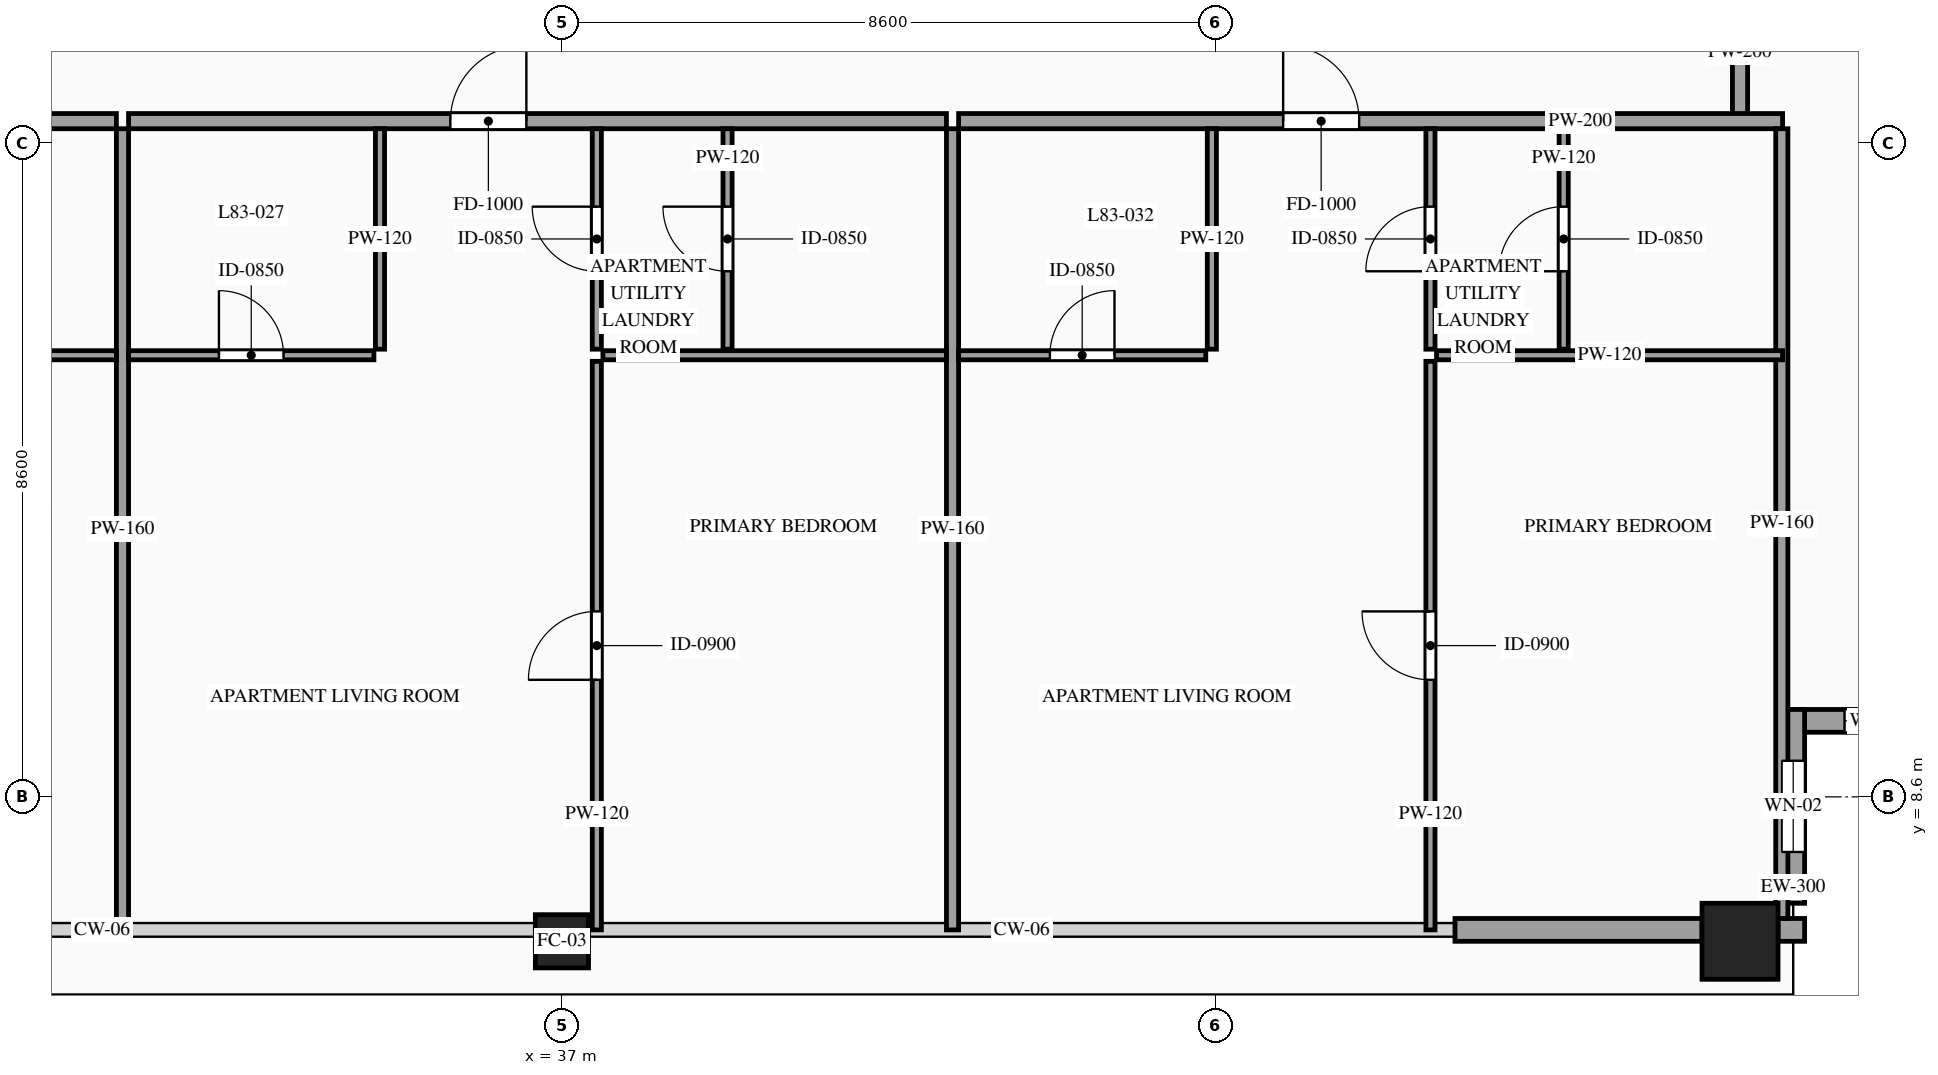
"""IFC4 building model, lengths in metres.
Left out: names, types, materials, properties, quantities, classifications, styles, units other than length and angle.
Written with IfcOpenShell. Run it as: python <this file> out.ifc"""

import sys

from ifc_helpers import new_model, si_unit, direction, frame, frame_2d, origin, origin_2d, place, context, subcontext, project, spatial, rectangle, hollow_rectangle, extrude, source, transform, mapped, element, fill, save


model = new_model("IFC4")
c1 = context("Model", 3, precision=1e-05, world=origin(), true_north=direction((0.0, 1.0)))
c2 = subcontext(c1, "Body", "Model", "MODEL_VIEW")
j1 = project(units=[si_unit("LENGTHUNIT", "METRE"), si_unit("PLANEANGLEUNIT", "RADIAN")], contexts=[c1])
p1 = place(None, origin())
s1 = spatial("IfcSite", under=j1, at=p1, CompositionType="ELEMENT")
p2 = place(p1, origin())
s2 = spatial("IfcBuilding", under=s1, at=p2, CompositionType="ELEMENT")
p3 = place(p2, frame((0.0, 0.0, 311.2)))
s3 = spatial("IfcBuildingStorey", under=s2, at=p3, CompositionType="ELEMENT", Elevation=311.2)
m1 = source(origin(), c2, "Body", "SweptSolid", [
    extrude(hollow_rectangle(XDim=0.7, YDim=0.7, WallThickness=0.032, at=origin_2d()), origin(), (0.0, 0.0, 1.0), 3.5),
])
p4 = place(p3, frame((37.0, 6.7, 0.0), z_axis=(0.0, 0.0, 1.0), x_axis=(1.0, 0.0, 0.0)))
e1 = element("IfcColumn", 1, at=p4, inside=s3, PredefinedType="COLUMN", context=c2, shape_type="MappedRepresentation", body=[
    mapped(m1, transform((0.0, 0.0, 0.0), scale=1.0)),
])
m2 = source(origin(), c2, "Body", "SweptSolid", [
    extrude(hollow_rectangle(XDim=1.0, YDim=1.0, WallThickness=0.048, at=origin_2d()), origin(), (0.0, 0.0, 1.0), 3.5),
])
p5 = place(p3, frame((52.5, 6.7, 0.0), z_axis=(0.0, 0.0, 1.0), x_axis=(1.0, 0.0, 0.0)))
e2 = element("IfcColumn", 2, at=p5, inside=s3, PredefinedType="COLUMN", context=c2, shape_type="MappedRepresentation", body=[
    mapped(m2, transform((0.0, 0.0, 0.0), scale=1.0)),
])
p6 = place(p3, frame((53.05, 9.6, 0.0), z_axis=(0.0, 0.0, 1.0), x_axis=(1.0, 0.0, 0.0)))
e3 = element("IfcWall", 3, at=p6, inside=s3, PredefinedType="SOLIDWALL", context=c2, shape_type="SweptSolid", body=[
    extrude(rectangle(XDim=2.55, YDim=0.3, at=frame_2d((1.275, 0.0))), origin(), (0.0, 0.0, 1.0), 3.28),
])
p7 = place(p6, frame((0.825, 0.0, 0.85)))
e4 = element("IfcOpeningElement", 4, at=p7, cuts=e3, PredefinedType="OPENING", context=c2, shape_type="SweptSolid", body=[
    extrude(rectangle(XDim=0.9, YDim=1.5, at=frame_2d((0.45, 0.75))), frame((0.0, 0.165, 0.0), z_axis=(0.0, -1.0, 0.0), x_axis=(1.0, 0.0, 0.0)), (0.0, 0.0, 1.0), 0.33),
])
p8 = place(p3, frame((53.2, 7.2, 0.0), z_axis=(0.0, 0.0, 1.0), x_axis=(0.0, 1.0, 0.0)))
e5 = element("IfcWall", 5, at=p8, inside=s3, PredefinedType="SOLIDWALL", context=c2, shape_type="SweptSolid", body=[
    extrude(rectangle(XDim=2.55, YDim=0.3, at=frame_2d((1.275, 0.0))), origin(), (0.0, 0.0, 1.0), 3.28),
])
p9 = place(p8, frame((0.675, 0.0, 0.85)))
e6 = element("IfcOpeningElement", 6, at=p9, cuts=e5, PredefinedType="OPENING", context=c2, shape_type="SweptSolid", body=[
    extrude(rectangle(XDim=1.2, YDim=2.1, at=frame_2d((0.6, 1.05))), frame((0.0, 0.165, 0.0), z_axis=(0.0, -1.0, 0.0), x_axis=(1.0, 0.0, 0.0)), (0.0, 0.0, 1.0), 0.33),
])
m3 = source(origin(), c2, "Body", "SweptSolid", [
    extrude(rectangle(XDim=0.35, YDim=0.3, at=frame_2d((0.175, 0.0))), origin(), (0.0, 0.0, 1.0), 3.28),
])
p10 = place(p3, frame((53.0, 6.85, 0.0), z_axis=(0.0, 0.0, 1.0), x_axis=(1.0, 0.0, 0.0)))
e7 = element("IfcWall", 7, at=p10, inside=s3, PredefinedType="SOLIDWALL", context=c2, shape_type="MappedRepresentation", body=[
    mapped(m3, transform((0.0, 0.0, 0.0), scale=1.0)),
])
m4 = source(origin(), c2, "Body", "SweptSolid", [
    extrude(rectangle(XDim=3.25, YDim=0.3, at=frame_2d((1.625, 0.0))), origin(), (0.0, 0.0, 1.0), 2.885),
])
p11 = place(p3, frame((48.75, 6.85, 0.0), z_axis=(0.0, 0.0, 1.0), x_axis=(1.0, 0.0, 0.0)))
e8 = element("IfcWall", 8, at=p11, inside=s3, PredefinedType="SOLIDWALL", context=c2, shape_type="MappedRepresentation", body=[
    mapped(m4, transform((0.0, 0.0, 0.0), scale=1.0)),
])
m5 = source(origin(), c2, "Body", "SweptSolid", [
    extrude(rectangle(XDim=1.7, YDim=0.2, at=frame_2d((0.85, 0.0))), origin(), (0.0, 0.0, 1.0), 3.28),
])
p12 = place(p3, frame((52.5, 17.55, 0.0), z_axis=(0.0, 0.0, 1.0), x_axis=(0.0, 1.0, 0.0)))
e9 = element("IfcWall", 9, at=p12, inside=s3, PredefinedType="PARTITIONING", context=c2, shape_type="MappedRepresentation", body=[
    mapped(m5, transform((0.0, 0.0, 0.0), scale=1.0)),
])
p13 = place(p3, frame((20.94, 17.49, 0.0), z_axis=(0.0, 0.0, 1.0), x_axis=(1.0, 0.0, 0.0)))
e10 = element("IfcWall", 10, at=p13, inside=s3, PredefinedType="PARTITIONING", context=c2, shape_type="SweptSolid", body=[
    extrude(rectangle(XDim=10.198, YDim=0.2, at=frame_2d((5.099, 0.0))), origin(), (0.0, 0.0, 1.0), 3.28),
])
p14 = place(p13, frame((3.987, 0.0, 0.0)))
e11 = element("IfcOpeningElement", 11, at=p14, cuts=e10, PredefinedType="OPENING", context=c2, shape_type="SweptSolid", body=[
    extrude(rectangle(XDim=1.0, YDim=2.2, at=frame_2d((0.5, 1.1))), frame((0.0, 0.115, 0.0), z_axis=(0.0, -1.0, 0.0), x_axis=(1.0, 0.0, 0.0)), (0.0, 0.0, 1.0), 0.23),
])
m6 = source(origin(), c2, "Body", "SweptSolid", [
    extrude(rectangle(XDim=10.54, YDim=0.16, at=frame_2d((5.27, 0.0))), origin(), (0.0, 0.0, 1.0), 3.28),
])
p15 = place(p3, frame((31.218, 6.85, 0.0), z_axis=(0.0, 0.0, 1.0), x_axis=(0.0, 1.0, 0.0)))
e12 = element("IfcWall", 12, at=p15, inside=s3, PredefinedType="PARTITIONING", context=c2, shape_type="MappedRepresentation", body=[
    mapped(m6, transform((0.0, 0.0, 0.0), scale=1.0)),
])
m7 = source(origin(), c2, "Body", "SweptSolid", [
    extrude(rectangle(XDim=4.283, YDim=0.12, at=frame_2d((2.142, 0.0))), origin(), (0.0, 0.0, 1.0), 3.28),
])
p16 = place(p3, frame((26.855, 14.41, 0.0), z_axis=(0.0, 0.0, 1.0), x_axis=(1.0, 0.0, 0.0)))
e13 = element("IfcWall", 13, at=p16, inside=s3, PredefinedType="PARTITIONING", context=c2, shape_type="MappedRepresentation", body=[
    mapped(m7, transform((0.0, 0.0, 0.0), scale=1.0)),
])
p17 = place(p3, frame((31.298, 17.49, 0.0), z_axis=(0.0, 0.0, 1.0), x_axis=(1.0, 0.0, 0.0)))
e14 = element("IfcWall", 14, at=p17, inside=s3, PredefinedType="PARTITIONING", context=c2, shape_type="SweptSolid", body=[
    extrude(rectangle(XDim=10.761, YDim=0.2, at=frame_2d((5.38, 0.0))), origin(), (0.0, 0.0, 1.0), 3.28),
])
p18 = place(p17, frame((4.234, 0.0, 0.0)))
e15 = element("IfcOpeningElement", 15, at=p18, cuts=e14, PredefinedType="OPENING", context=c2, shape_type="SweptSolid", body=[
    extrude(rectangle(XDim=1.0, YDim=2.2, at=frame_2d((0.5, 1.1))), frame((0.0, 0.115, 0.0), z_axis=(0.0, -1.0, 0.0), x_axis=(1.0, 0.0, 0.0)), (0.0, 0.0, 1.0), 0.23),
])
p19 = place(p3, frame((42.139, 6.85, 0.0), z_axis=(0.0, 0.0, 1.0), x_axis=(0.0, 1.0, 0.0)))
e16 = element("IfcWall", 16, at=p19, inside=s3, PredefinedType="PARTITIONING", context=c2, shape_type="MappedRepresentation", body=[
    mapped(m6, transform((0.0, 0.0, 0.0), scale=1.0)),
])
p20 = place(p3, frame((31.298, 14.41, 0.0), z_axis=(0.0, 0.0, 1.0), x_axis=(1.0, 0.0, 0.0)))
e17 = element("IfcWall", 17, at=p20, inside=s3, PredefinedType="PARTITIONING", context=c2, shape_type="SweptSolid", body=[
    extrude(rectangle(XDim=3.228, YDim=0.12, at=frame_2d((1.614, 0.0))), origin(), (0.0, 0.0, 1.0), 3.28),
])
p21 = place(p20, frame((1.189, 0.0, 0.0)))
e18 = element("IfcOpeningElement", 18, at=p21, cuts=e17, PredefinedType="OPENING", context=c2, shape_type="SweptSolid", body=[
    extrude(rectangle(XDim=0.85, YDim=2.1, at=frame_2d((0.425, 1.05))), frame((0.0, 0.075, 0.0), z_axis=(0.0, -1.0, 0.0), x_axis=(1.0, 0.0, 0.0)), (0.0, 0.0, 1.0), 0.15),
])
m8 = source(origin(), c2, "Body", "SweptSolid", [
    extrude(rectangle(XDim=2.9, YDim=0.12, at=frame_2d((1.45, 0.0))), origin(), (0.0, 0.0, 1.0), 3.28),
])
p22 = place(p3, frame((34.606, 14.49, 0.0), z_axis=(0.0, 0.0, 1.0), x_axis=(0.0, 1.0, 0.0)))
e19 = element("IfcWall", 19, at=p22, inside=s3, PredefinedType="PARTITIONING", context=c2, shape_type="MappedRepresentation", body=[
    mapped(m8, transform((0.0, 0.0, 0.0), scale=1.0)),
])
p23 = place(p3, frame((39.179, 14.49, 0.0), z_axis=(0.0, 0.0, 1.0), x_axis=(0.0, 1.0, 0.0)))
e20 = element("IfcWall", 20, at=p23, inside=s3, PredefinedType="PARTITIONING", context=c2, shape_type="SweptSolid", body=[
    extrude(rectangle(XDim=2.9, YDim=0.12, at=frame_2d((1.45, 0.0))), origin(), (0.0, 0.0, 1.0), 3.28),
])
p24 = place(p23, frame((1.025, 0.0, 0.0)))
e21 = element("IfcOpeningElement", 21, at=p24, cuts=e20, PredefinedType="OPENING", context=c2, shape_type="SweptSolid", body=[
    extrude(rectangle(XDim=0.85, YDim=2.1, at=frame_2d((0.425, 1.05))), frame((0.0, 0.075, 0.0), z_axis=(0.0, -1.0, 0.0), x_axis=(1.0, 0.0, 0.0)), (0.0, 0.0, 1.0), 0.15),
])
m9 = source(origin(), c2, "Body", "SweptSolid", [
    extrude(rectangle(XDim=4.52, YDim=0.12, at=frame_2d((2.26, 0.0))), origin(), (0.0, 0.0, 1.0), 3.28),
])
p25 = place(p3, frame((37.539, 14.41, 0.0), z_axis=(0.0, 0.0, 1.0), x_axis=(1.0, 0.0, 0.0)))
e22 = element("IfcWall", 22, at=p25, inside=s3, PredefinedType="PARTITIONING", context=c2, shape_type="MappedRepresentation", body=[
    mapped(m9, transform((0.0, 0.0, 0.0), scale=1.0)),
])
p26 = place(p3, frame((37.459, 6.85, 0.0), z_axis=(0.0, 0.0, 1.0), x_axis=(0.0, 1.0, 0.0)))
e23 = element("IfcWall", 23, at=p26, inside=s3, PredefinedType="PARTITIONING", context=c2, shape_type="SweptSolid", body=[
    extrude(rectangle(XDim=7.48, YDim=0.12, at=frame_2d((3.74, 0.0))), origin(), (0.0, 0.0, 1.0), 3.28),
])
p27 = place(p26, frame((3.29, 0.0, 0.0)))
e24 = element("IfcOpeningElement", 24, at=p27, cuts=e23, PredefinedType="OPENING", context=c2, shape_type="SweptSolid", body=[
    extrude(rectangle(XDim=0.9, YDim=2.15, at=frame_2d((0.45, 1.075))), frame((0.0, 0.075, 0.0), z_axis=(0.0, -1.0, 0.0), x_axis=(1.0, 0.0, 0.0)), (0.0, 0.0, 1.0), 0.15),
])
p28 = place(p3, frame((37.459, 14.49, 0.0), z_axis=(0.0, 0.0, 1.0), x_axis=(0.0, 1.0, 0.0)))
e25 = element("IfcWall", 25, at=p28, inside=s3, PredefinedType="PARTITIONING", context=c2, shape_type="SweptSolid", body=[
    extrude(rectangle(XDim=2.9, YDim=0.12, at=frame_2d((1.45, 0.0))), origin(), (0.0, 0.0, 1.0), 3.28),
])
p29 = place(p28, frame((1.025, 0.0, 0.0)))
e26 = element("IfcOpeningElement", 26, at=p29, cuts=e25, PredefinedType="OPENING", context=c2, shape_type="SweptSolid", body=[
    extrude(rectangle(XDim=0.85, YDim=2.1, at=frame_2d((0.425, 1.05))), frame((0.0, 0.075, 0.0), z_axis=(0.0, -1.0, 0.0), x_axis=(1.0, 0.0, 0.0)), (0.0, 0.0, 1.0), 0.15),
])
p30 = place(p3, frame((42.219, 17.49, 0.0), z_axis=(0.0, 0.0, 1.0), x_axis=(1.0, 0.0, 0.0)))
e27 = element("IfcWall", 27, at=p30, inside=s3, PredefinedType="PARTITIONING", context=c2, shape_type="SweptSolid", body=[
    extrude(rectangle(XDim=10.841, YDim=0.2, at=frame_2d((5.42, 0.0))), origin(), (0.0, 0.0, 1.0), 3.28),
])
p31 = place(p30, frame((4.27, 0.0, 0.0)))
e28 = element("IfcOpeningElement", 28, at=p31, cuts=e27, PredefinedType="OPENING", context=c2, shape_type="SweptSolid", body=[
    extrude(rectangle(XDim=1.0, YDim=2.2, at=frame_2d((0.5, 1.1))), frame((0.0, 0.115, 0.0), z_axis=(0.0, -1.0, 0.0), x_axis=(1.0, 0.0, 0.0)), (0.0, 0.0, 1.0), 0.23),
])
m10 = source(origin(), c2, "Body", "SweptSolid", [
    extrude(rectangle(XDim=10.39, YDim=0.16, at=frame_2d((5.195, 0.0))), origin(), (0.0, 0.0, 1.0), 3.28),
])
p32 = place(p3, frame((53.05, 7.0, 0.0), z_axis=(0.0, 0.0, 1.0), x_axis=(0.0, 1.0, 0.0)))
e29 = element("IfcWall", 29, at=p32, inside=s3, PredefinedType="PARTITIONING", context=c2, shape_type="MappedRepresentation", body=[
    mapped(m10, transform((0.0, 0.0, 0.0), scale=1.0)),
])
p33 = place(p3, frame((42.219, 14.41, 0.0), z_axis=(0.0, 0.0, 1.0), x_axis=(1.0, 0.0, 0.0)))
e30 = element("IfcWall", 30, at=p33, inside=s3, PredefinedType="PARTITIONING", context=c2, shape_type="SweptSolid", body=[
    extrude(rectangle(XDim=3.252, YDim=0.12, at=frame_2d((1.626, 0.0))), origin(), (0.0, 0.0, 1.0), 3.28),
])
p34 = place(p33, frame((1.201, 0.0, 0.0)))
e31 = element("IfcOpeningElement", 31, at=p34, cuts=e30, PredefinedType="OPENING", context=c2, shape_type="SweptSolid", body=[
    extrude(rectangle(XDim=0.85, YDim=2.1, at=frame_2d((0.425, 1.05))), frame((0.0, 0.075, 0.0), z_axis=(0.0, -1.0, 0.0), x_axis=(1.0, 0.0, 0.0)), (0.0, 0.0, 1.0), 0.15),
])
p35 = place(p3, frame((45.551, 14.49, 0.0), z_axis=(0.0, 0.0, 1.0), x_axis=(0.0, 1.0, 0.0)))
e32 = element("IfcWall", 32, at=p35, inside=s3, PredefinedType="PARTITIONING", context=c2, shape_type="MappedRepresentation", body=[
    mapped(m8, transform((0.0, 0.0, 0.0), scale=1.0)),
])
p36 = place(p3, frame((50.18, 14.49, 0.0), z_axis=(0.0, 0.0, 1.0), x_axis=(0.0, 1.0, 0.0)))
e33 = element("IfcWall", 33, at=p36, inside=s3, PredefinedType="PARTITIONING", context=c2, shape_type="SweptSolid", body=[
    extrude(rectangle(XDim=2.9, YDim=0.12, at=frame_2d((1.45, 0.0))), origin(), (0.0, 0.0, 1.0), 2.825),
])
p37 = place(p36, frame((1.025, 0.0, 0.0)))
e34 = element("IfcOpeningElement", 34, at=p37, cuts=e33, PredefinedType="OPENING", context=c2, shape_type="SweptSolid", body=[
    extrude(rectangle(XDim=0.85, YDim=2.1, at=frame_2d((0.425, 1.05))), frame((0.0, 0.075, 0.0), z_axis=(0.0, -1.0, 0.0), x_axis=(1.0, 0.0, 0.0)), (0.0, 0.0, 1.0), 0.15),
])
m11 = source(origin(), c2, "Body", "SweptSolid", [
    extrude(rectangle(XDim=4.553, YDim=0.12, at=frame_2d((2.276, 0.0))), origin(), (0.0, 0.0, 1.0), 3.28),
])
p38 = place(p3, frame((48.507, 14.41, 0.0), z_axis=(0.0, 0.0, 1.0), x_axis=(1.0, 0.0, 0.0)))
e35 = element("IfcWall", 35, at=p38, inside=s3, PredefinedType="PARTITIONING", context=c2, shape_type="MappedRepresentation", body=[
    mapped(m11, transform((0.0, 0.0, 0.0), scale=1.0)),
])
p39 = place(p3, frame((48.427, 6.85, 0.0), z_axis=(0.0, 0.0, 1.0), x_axis=(0.0, 1.0, 0.0)))
e36 = element("IfcWall", 36, at=p39, inside=s3, PredefinedType="PARTITIONING", context=c2, shape_type="SweptSolid", body=[
    extrude(rectangle(XDim=7.48, YDim=0.12, at=frame_2d((3.74, 0.0))), origin(), (0.0, 0.0, 1.0), 3.28),
])
p40 = place(p39, frame((3.29, 0.0, 0.0)))
e37 = element("IfcOpeningElement", 37, at=p40, cuts=e36, PredefinedType="OPENING", context=c2, shape_type="SweptSolid", body=[
    extrude(rectangle(XDim=0.9, YDim=2.15, at=frame_2d((0.45, 1.075))), frame((0.0, 0.075, 0.0), z_axis=(0.0, -1.0, 0.0), x_axis=(1.0, 0.0, 0.0)), (0.0, 0.0, 1.0), 0.15),
])
p41 = place(p3, frame((48.427, 14.49, 0.0), z_axis=(0.0, 0.0, 1.0), x_axis=(0.0, 1.0, 0.0)))
e38 = element("IfcWall", 38, at=p41, inside=s3, PredefinedType="PARTITIONING", context=c2, shape_type="SweptSolid", body=[
    extrude(rectangle(XDim=2.9, YDim=0.12, at=frame_2d((1.45, 0.0))), origin(), (0.0, 0.0, 1.0), 3.28),
])
p42 = place(p41, frame((1.025, 0.0, 0.0)))
e39 = element("IfcOpeningElement", 39, at=p42, cuts=e38, PredefinedType="OPENING", context=c2, shape_type="SweptSolid", body=[
    extrude(rectangle(XDim=0.85, YDim=2.1, at=frame_2d((0.425, 1.05))), frame((0.0, 0.075, 0.0), z_axis=(0.0, -1.0, 0.0), x_axis=(1.0, 0.0, 0.0)), (0.0, 0.0, 1.0), 0.15),
])
m12 = source(origin(), c2, "Body", "SweptSolid", [
    extrude(rectangle(XDim=0.9, YDim=1.5, at=frame_2d((0.45, 0.75))), frame((0.0, 0.03, 0.0), z_axis=(0.0, -1.0, 0.0), x_axis=(1.0, 0.0, 0.0)), (0.0, 0.0, 1.0), 0.06),
])
p43 = place(p7, origin())
e40 = element("IfcWindow", 40, at=p43, inside=s3, PartitioningType="SINGLE_PANEL", PredefinedType="WINDOW", context=c2, shape_type="MappedRepresentation", body=[
    mapped(m12, transform((0.0, 0.0, 0.0), scale=1.0)),
])
fill(e4, e40)
m13 = source(origin(), c2, "Body", "SweptSolid", [
    extrude(rectangle(XDim=1.2, YDim=2.1, at=frame_2d((0.6, 1.05))), frame((0.0, 0.03, 0.0), z_axis=(0.0, -1.0, 0.0), x_axis=(1.0, 0.0, 0.0)), (0.0, 0.0, 1.0), 0.06),
])
p44 = place(p9, origin())
e41 = element("IfcWindow", 41, at=p44, inside=s3, PartitioningType="SINGLE_PANEL", PredefinedType="WINDOW", context=c2, shape_type="MappedRepresentation", body=[
    mapped(m13, transform((0.0, 0.0, 0.0), scale=1.0)),
])
fill(e6, e41)
m14 = source(origin(), c2, "Body", "SweptSolid", [
    extrude(rectangle(XDim=1.0, YDim=2.2, at=frame_2d((0.5, 1.1))), frame((0.0, 0.025, 0.0), z_axis=(0.0, -1.0, 0.0), x_axis=(1.0, 0.0, 0.0)), (0.0, 0.0, 1.0), 0.05),
])
p45 = place(p18, origin())
e42 = element("IfcDoor", 42, at=p45, inside=s3, OperationType="SINGLE_SWING_RIGHT", PredefinedType="DOOR", context=c2, shape_type="MappedRepresentation", body=[
    mapped(m14, transform((0.0, 0.0, 0.0), scale=1.0)),
])
fill(e15, e42)
m15 = source(origin(), c2, "Body", "SweptSolid", [
    extrude(rectangle(XDim=0.85, YDim=2.1, at=frame_2d((0.425, 1.05))), frame((0.0, 0.025, 0.0), z_axis=(0.0, -1.0, 0.0), x_axis=(1.0, 0.0, 0.0)), (0.0, 0.0, 1.0), 0.05),
])
p46 = place(p21, origin())
e43 = element("IfcDoor", 43, at=p46, inside=s3, OperationType="SINGLE_SWING_LEFT", PredefinedType="DOOR", context=c2, shape_type="MappedRepresentation", body=[
    mapped(m15, transform((0.0, 0.0, 0.0), scale=1.0)),
])
fill(e18, e43)
p47 = place(p24, origin())
e44 = element("IfcDoor", 44, at=p47, inside=s3, OperationType="SINGLE_SWING_RIGHT", PredefinedType="DOOR", context=c2, shape_type="MappedRepresentation", body=[
    mapped(m15, transform((0.0, 0.0, 0.0), scale=1.0)),
])
fill(e21, e44)
m16 = source(origin(), c2, "Body", "SweptSolid", [
    extrude(rectangle(XDim=0.9, YDim=2.15, at=frame_2d((0.45, 1.075))), frame((0.0, 0.025, 0.0), z_axis=(0.0, -1.0, 0.0), x_axis=(1.0, 0.0, 0.0)), (0.0, 0.0, 1.0), 0.05),
])
p48 = place(p27, origin())
e45 = element("IfcDoor", 45, at=p48, inside=s3, OperationType="SINGLE_SWING_LEFT", PredefinedType="DOOR", context=c2, shape_type="MappedRepresentation", body=[
    mapped(m16, transform((0.0, 0.0, 0.0), scale=1.0)),
])
fill(e24, e45)
p49 = place(p29, origin())
e46 = element("IfcDoor", 46, at=p49, inside=s3, OperationType="SINGLE_SWING_RIGHT", PredefinedType="DOOR", context=c2, shape_type="MappedRepresentation", body=[
    mapped(m15, transform((0.0, 0.0, 0.0), scale=1.0)),
])
fill(e26, e46)
p50 = place(p31, origin())
e47 = element("IfcDoor", 47, at=p50, inside=s3, OperationType="SINGLE_SWING_LEFT", PredefinedType="DOOR", context=c2, shape_type="MappedRepresentation", body=[
    mapped(m14, transform((0.0, 0.0, 0.0), scale=1.0)),
])
fill(e28, e47)
p51 = place(p34, origin())
e48 = element("IfcDoor", 48, at=p51, inside=s3, OperationType="SINGLE_SWING_RIGHT", PredefinedType="DOOR", context=c2, shape_type="MappedRepresentation", body=[
    mapped(m15, transform((0.0, 0.0, 0.0), scale=1.0)),
])
fill(e31, e48)
p52 = place(p37, origin())
e49 = element("IfcDoor", 49, at=p52, inside=s3, OperationType="SINGLE_SWING_LEFT", PredefinedType="DOOR", context=c2, shape_type="MappedRepresentation", body=[
    mapped(m15, transform((0.0, 0.0, 0.0), scale=1.0)),
])
fill(e34, e49)
p53 = place(p40, origin())
e50 = element("IfcDoor", 50, at=p53, inside=s3, OperationType="SINGLE_SWING_RIGHT", PredefinedType="DOOR", context=c2, shape_type="MappedRepresentation", body=[
    mapped(m16, transform((0.0, 0.0, 0.0), scale=1.0)),
])
fill(e37, e50)
p54 = place(p42, origin())
e51 = element("IfcDoor", 51, at=p54, inside=s3, OperationType="SINGLE_SWING_LEFT", PredefinedType="DOOR", context=c2, shape_type="MappedRepresentation", body=[
    mapped(m15, transform((0.0, 0.0, 0.0), scale=1.0)),
])
fill(e39, e51)
save(model, sys.argv[1])
